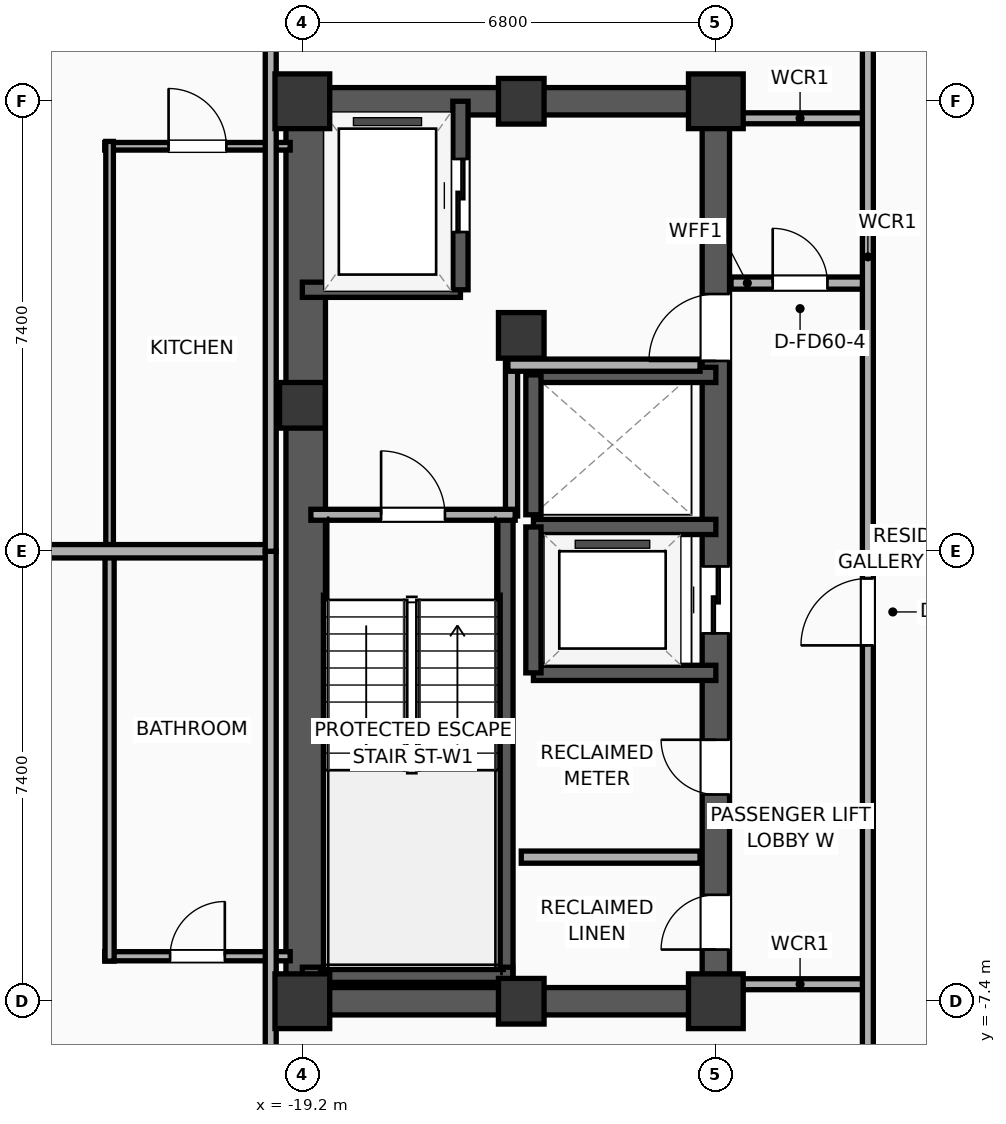
"""IFC4 building model, lengths in metres.
Left out: names, types, materials, properties, quantities, classifications, styles, units other than length and angle.
Written with IfcOpenShell. Run it as: python <this file> out.ifc"""

import sys

from ifc_helpers import new_model, si_unit, direction, frame, frame_2d, origin, origin_2d, place, context, subcontext, project, spatial, rectangle, extrude, element, fill, save


model = new_model("IFC4")
c1 = context("Model", 3, precision=1e-05, world=origin(), true_north=direction((0.0, 1.0)))
c2 = subcontext(c1, "Body", "Model", "MODEL_VIEW")
j1 = project(units=[si_unit("LENGTHUNIT", "METRE"), si_unit("PLANEANGLEUNIT", "RADIAN")], contexts=[c1])
p1 = place(None, origin())
s1 = spatial("IfcSite", under=j1, at=p1, CompositionType="ELEMENT")
p2 = place(p1, origin())
s2 = spatial("IfcBuilding", under=s1, at=p2, CompositionType="ELEMENT")
p3 = place(p2, frame((0.0, 0.0, 152.1)))
s3 = spatial("IfcBuildingStorey", under=s2, at=p3, CompositionType="ELEMENT", Elevation=152.1)
p4 = place(p3, frame((-19.2, -7.4, 0.0), z_axis=(0.0, 0.0, 1.0), x_axis=(1.0, 0.0, 0.0)))
e1 = element("IfcColumn", 1, at=p4, inside=s3, PredefinedType="COLUMN", context=c2, shape_type="SweptSolid", body=[
    extrude(rectangle(XDim=0.9, YDim=0.9, at=origin_2d()), origin(), (0.0, 0.0, 1.0), 3.9),
])
p5 = place(p3, frame((-19.2, 2.4, 0.0), z_axis=(0.0, 0.0, 1.0), x_axis=(1.0, 0.0, 0.0)))
e2 = element("IfcColumn", 2, at=p5, inside=s3, PredefinedType="COLUMN", context=c2, shape_type="SweptSolid", body=[
    extrude(rectangle(XDim=0.75, YDim=0.75, at=origin_2d()), origin(), (0.0, 0.0, 1.0), 3.9),
])
p6 = place(p3, frame((-19.2, 7.4, 0.0), z_axis=(0.0, 0.0, 1.0), x_axis=(1.0, 0.0, 0.0)))
e3 = element("IfcColumn", 3, at=p6, inside=s3, PredefinedType="COLUMN", context=c2, shape_type="SweptSolid", body=[
    extrude(rectangle(XDim=0.9, YDim=0.9, at=origin_2d()), origin(), (0.0, 0.0, 1.0), 3.9),
])
for number, where, z_axis, x_axis in (
    (4, (-15.6, -7.4, 0.0), (0.0, 0.0, 1.0), (1.0, 0.0, 0.0)),
    (5, (-15.6, 7.4, 0.0), (0.0, 0.0, 1.0), (1.0, 0.0, 0.0)),
):
    element("IfcColumn", number, at=place(p3, frame(where, z_axis=z_axis, x_axis=x_axis)), inside=s3, PredefinedType="COLUMN", context=c2, shape_type="SweptSolid", body=[
        extrude(rectangle(XDim=0.75, YDim=0.75, at=origin_2d()), origin(), (0.0, 0.0, 1.0), 3.9),
    ])
p7 = place(p3, frame((-12.4, -7.4, 0.0), z_axis=(0.0, 0.0, 1.0), x_axis=(1.0, 0.0, 0.0)))
e6 = element("IfcColumn", 6, at=p7, inside=s3, PredefinedType="COLUMN", context=c2, shape_type="SweptSolid", body=[
    extrude(rectangle(XDim=0.9, YDim=0.9, at=origin_2d()), origin(), (0.0, 0.0, 1.0), 3.9),
])
p8 = place(p3, frame((-15.6, 3.55, 0.0), z_axis=(0.0, 0.0, 1.0), x_axis=(1.0, 0.0, 0.0)))
e7 = element("IfcColumn", 7, at=p8, inside=s3, PredefinedType="COLUMN", context=c2, shape_type="SweptSolid", body=[
    extrude(rectangle(XDim=0.75, YDim=0.75, at=origin_2d()), origin(), (0.0, 0.0, 1.0), 3.9),
])
p9 = place(p3, frame((-12.4, 7.4, 0.0), z_axis=(0.0, 0.0, 1.0), x_axis=(1.0, 0.0, 0.0)))
e8 = element("IfcColumn", 8, at=p9, inside=s3, PredefinedType="COLUMN", context=c2, shape_type="SweptSolid", body=[
    extrude(rectangle(XDim=0.9, YDim=0.9, at=origin_2d()), origin(), (0.0, 0.0, 1.0), 3.9),
])
for number, where, z_axis, x_axis in (
    (9, (-19.425, -7.4, 0.0), (0.0, 0.0, 1.0), (1.0, 0.0, 0.0)),
    (10, (-19.425, 7.4, 0.0), (0.0, 0.0, 1.0), (1.0, 0.0, 0.0)),
):
    element("IfcWall", number, at=place(p3, frame(where, z_axis=z_axis, x_axis=x_axis)), inside=s3, PredefinedType="SHEAR", context=c2, shape_type="SweptSolid", body=[
        extrude(rectangle(XDim=7.25, YDim=0.45, at=frame_2d((3.625, 0.0))), origin(), (0.0, 0.0, 1.0), 3.65),
    ])
p10 = place(p3, frame((-19.145, -7.4, 0.0), z_axis=(0.0, 0.0, 1.0), x_axis=(0.0, 1.0, 0.0)))
e11 = element("IfcWall", 11, at=p10, inside=s3, PredefinedType="SHEAR", context=c2, shape_type="SweptSolid", body=[
    extrude(rectangle(XDim=14.8, YDim=0.65, at=frame_2d((7.4, 0.0))), origin(), (0.0, 0.0, 1.0), 3.65),
])
p11 = place(p3, frame((-12.4, -7.4, 0.0), z_axis=(0.0, 0.0, 1.0), x_axis=(0.0, 1.0, 0.0)))
e12 = element("IfcWall", 12, at=p11, inside=s3, PredefinedType="SHEAR", context=c2, shape_type="SweptSolid", body=[
    extrude(rectangle(XDim=14.8, YDim=0.45, at=frame_2d((7.4, 0.0))), origin(), (0.0, 0.0, 1.0), 3.65),
])
p12 = place(p11, frame((6.05, 0.0, 0.0)))
e13 = element("IfcOpeningElement", 13, at=p12, cuts=e12, PredefinedType="OPENING", context=c2, shape_type="SweptSolid", body=[
    extrude(rectangle(XDim=1.1, YDim=2.05, at=frame_2d((0.55, 1.025))), frame((0.0, 0.235, 0.0), z_axis=(0.0, -1.0, 0.0), x_axis=(1.0, 0.0, 0.0)), (0.0, 0.0, 1.0), 0.47),
])
p13 = place(p11, frame((10.53, 0.0, 0.0)))
e14 = element("IfcOpeningElement", 14, at=p13, cuts=e12, PredefinedType="OPENING", context=c2, shape_type="SweptSolid", body=[
    extrude(rectangle(XDim=1.1, YDim=2.05, at=frame_2d((0.55, 1.025))), frame((0.0, 0.235, 0.0), z_axis=(0.0, -1.0, 0.0), x_axis=(1.0, 0.0, 0.0)), (0.0, 0.0, 1.0), 0.47),
])
p14 = place(p11, frame((0.85, 0.0, 0.0)))
e15 = element("IfcOpeningElement", 15, at=p14, cuts=e12, PredefinedType="OPENING", context=c2, shape_type="SweptSolid", body=[
    extrude(rectangle(XDim=0.9, YDim=2.05, at=frame_2d((0.45, 1.025))), frame((0.0, 0.235, 0.0), z_axis=(0.0, -1.0, 0.0), x_axis=(1.0, 0.0, 0.0)), (0.0, 0.0, 1.0), 0.47),
])
p15 = place(p11, frame((3.4, 0.0, 0.0)))
e16 = element("IfcOpeningElement", 16, at=p15, cuts=e12, PredefinedType="OPENING", context=c2, shape_type="SweptSolid", body=[
    extrude(rectangle(XDim=0.9, YDim=2.05, at=frame_2d((0.45, 1.025))), frame((0.0, 0.235, 0.0), z_axis=(0.0, -1.0, 0.0), x_axis=(1.0, 0.0, 0.0)), (0.0, 0.0, 1.0), 0.47),
])
p16 = place(p3, frame((-15.86, -7.085, 0.0), z_axis=(0.0, 0.0, 1.0), x_axis=(0.0, 1.0, 0.0)))
e17 = element("IfcWall", 17, at=p16, inside=s3, PredefinedType="SOLIDWALL", context=c2, shape_type="SweptSolid", body=[
    extrude(rectangle(XDim=7.685, YDim=0.25, at=frame_2d((3.843, 0.0))), origin(), (0.0, 0.0, 1.0), 3.65),
])
p17 = place(p3, frame((-19.2, -6.965, 0.0), z_axis=(0.0, 0.0, 1.0), x_axis=(1.0, 0.0, 0.0)))
e18 = element("IfcWall", 18, at=p17, inside=s3, PredefinedType="SOLIDWALL", context=c2, shape_type="SweptSolid", body=[
    extrude(rectangle(XDim=3.46, YDim=0.25, at=frame_2d((1.73, 0.0))), origin(), (0.0, 0.0, 1.0), 3.65),
])
p18 = place(p3, frame((-19.2, 4.3, 0.0), z_axis=(0.0, 0.0, 1.0), x_axis=(1.0, 0.0, 0.0)))
e19 = element("IfcWall", 19, at=p18, inside=s3, PredefinedType="SOLIDWALL", context=c2, shape_type="SweptSolid", body=[
    extrude(rectangle(XDim=2.6, YDim=0.25, at=frame_2d((1.3, 0.0))), origin(), (0.0, 0.0, 1.0), 3.65),
])
p19 = place(p3, frame((-16.6, 4.3, 0.0), z_axis=(0.0, 0.0, 1.0), x_axis=(0.0, 1.0, 0.0)))
e20 = element("IfcWall", 20, at=p19, inside=s3, PredefinedType="SOLIDWALL", context=c2, shape_type="SweptSolid", body=[
    extrude(rectangle(XDim=3.1, YDim=0.25, at=frame_2d((1.55, 0.0))), origin(), (0.0, 0.0, 1.0), 3.65),
])
p20 = place(p19, frame((0.95, 0.0, 0.0)))
e21 = element("IfcOpeningElement", 21, at=p20, cuts=e20, PredefinedType="OPENING", context=c2, shape_type="SweptSolid", body=[
    extrude(rectangle(XDim=1.2, YDim=2.05, at=frame_2d((0.6, 1.025))), frame((0.0, 0.135, 0.0), z_axis=(0.0, -1.0, 0.0), x_axis=(1.0, 0.0, 0.0)), (0.0, 0.0, 1.0), 0.27),
])
for number, where, z_axis, x_axis in (
    (22, (-15.4, -2.0, 0.0), (0.0, 0.0, 1.0), (1.0, 0.0, 0.0)),
    (23, (-12.4, 0.4, 0.0), (0.0, 0.0, 1.0), (-1.0, 0.0, 0.0)),
):
    element("IfcWall", number, at=place(p3, frame(where, z_axis=z_axis, x_axis=x_axis)), inside=s3, PredefinedType="SOLIDWALL", context=c2, shape_type="SweptSolid", body=[
        extrude(rectangle(XDim=3.0, YDim=0.25, at=frame_2d((1.5, 0.0))), origin(), (0.0, 0.0, 1.0), 3.65),
    ])
p21 = place(p3, frame((-15.4, 0.4, 0.0), z_axis=(0.0, 0.0, 1.0), x_axis=(0.0, -1.0, 0.0)))
e24 = element("IfcWall", 24, at=p21, inside=s3, PredefinedType="SOLIDWALL", context=c2, shape_type="SweptSolid", body=[
    extrude(rectangle(XDim=2.4, YDim=0.25, at=frame_2d((1.2, 0.0))), origin(), (0.0, 0.0, 1.0), 3.65),
])
p22 = place(p3, frame((-12.4, 2.9, 0.0), z_axis=(0.0, 0.0, 1.0), x_axis=(-1.0, 0.0, 0.0)))
e25 = element("IfcWall", 25, at=p22, inside=s3, PredefinedType="SOLIDWALL", context=c2, shape_type="SweptSolid", body=[
    extrude(rectangle(XDim=3.0, YDim=0.25, at=frame_2d((1.5, 0.0))), origin(), (0.0, 0.0, 1.0), 3.65),
])
p23 = place(p3, frame((-15.4, 2.9, 0.0), z_axis=(0.0, 0.0, 1.0), x_axis=(0.0, -1.0, 0.0)))
e26 = element("IfcWall", 26, at=p23, inside=s3, PredefinedType="SOLIDWALL", context=c2, shape_type="SweptSolid", body=[
    extrude(rectangle(XDim=2.3, YDim=0.25, at=frame_2d((1.15, 0.0))), origin(), (0.0, 0.0, 1.0), 3.65),
])
p24 = place(p3, frame((-15.76, 0.58, 0.0), z_axis=(0.0, 0.0, 1.0), x_axis=(0.0, 1.0, 0.0)))
e27 = element("IfcWall", 27, at=p24, inside=s3, PredefinedType="PARTITIONING", context=c2, shape_type="SweptSolid", body=[
    extrude(rectangle(XDim=2.52, YDim=0.2, at=frame_2d((1.26, 0.0))), origin(), (0.0, 0.0, 1.0), 3.65),
])
p25 = place(p3, frame((-15.82, 3.06, 0.0), z_axis=(0.0, 0.0, 1.0), x_axis=(1.0, 0.0, 0.0)))
e28 = element("IfcWall", 28, at=p25, inside=s3, PredefinedType="PARTITIONING", context=c2, shape_type="SweptSolid", body=[
    extrude(rectangle(XDim=3.16, YDim=0.2, at=frame_2d((1.58, 0.0))), origin(), (0.0, 0.0, 1.0), 3.65),
])
p26 = place(p3, frame((-19.06, 0.6, 0.0), z_axis=(0.0, 0.0, 1.0), x_axis=(1.0, 0.0, 0.0)))
e29 = element("IfcWall", 29, at=p26, inside=s3, PredefinedType="PARTITIONING", context=c2, shape_type="SweptSolid", body=[
    extrude(rectangle(XDim=3.36, YDim=0.18, at=frame_2d((1.68, 0.0))), origin(), (0.0, 0.0, 1.0), 3.65),
])
p27 = place(p26, frame((1.155, 0.0, 0.0)))
e30 = element("IfcOpeningElement", 30, at=p27, cuts=e29, PredefinedType="OPENING", context=c2, shape_type="SweptSolid", body=[
    extrude(rectangle(XDim=1.05, YDim=2.05, at=frame_2d((0.525, 1.025))), frame((0.0, 0.1, 0.0), z_axis=(0.0, -1.0, 0.0), x_axis=(1.0, 0.0, 0.0)), (0.0, 0.0, 1.0), 0.2),
])
p28 = place(p3, frame((-15.6, -5.03, 0.0), z_axis=(0.0, 0.0, 1.0), x_axis=(1.0, 0.0, 0.0)))
e31 = element("IfcWall", 31, at=p28, inside=s3, PredefinedType="PARTITIONING", context=c2, shape_type="SweptSolid", body=[
    extrude(rectangle(XDim=2.94, YDim=0.2, at=frame_2d((1.47, 0.0))), origin(), (0.0, 0.0, 1.0), 3.65),
])
p29 = place(p3, frame((-12.15, 4.41, 0.0), z_axis=(0.0, 0.0, 1.0), x_axis=(1.0, 0.0, 0.0)))
e32 = element("IfcWall", 32, at=p29, inside=s3, PredefinedType="PARTITIONING", context=c2, shape_type="SweptSolid", body=[
    extrude(rectangle(XDim=2.27, YDim=0.2, at=frame_2d((1.135, 0.0))), origin(), (0.0, 0.0, 1.0), 3.65),
])
p30 = place(p29, frame((0.685, 0.0, 0.0)))
e33 = element("IfcOpeningElement", 33, at=p30, cuts=e32, PredefinedType="OPENING", context=c2, shape_type="SweptSolid", body=[
    extrude(rectangle(XDim=0.9, YDim=2.05, at=frame_2d((0.45, 1.025))), frame((0.0, 0.11, 0.0), z_axis=(0.0, -1.0, 0.0), x_axis=(1.0, 0.0, 0.0)), (0.0, 0.0, 1.0), 0.22),
])
for number, where, z_axis, x_axis in (
    (34, (-12.15, 7.12, 0.0), (0.0, 0.0, 1.0), (1.0, 0.0, 0.0)),
    (35, (-12.15, -7.12, 0.0), (0.0, 0.0, 1.0), (1.0, 0.0, 0.0)),
):
    element("IfcWall", number, at=place(p3, frame(where, z_axis=z_axis, x_axis=x_axis)), inside=s3, PredefinedType="PARTITIONING", context=c2, shape_type="SweptSolid", body=[
        extrude(rectangle(XDim=2.27, YDim=0.18, at=frame_2d((1.135, 0.0))), origin(), (0.0, 0.0, 1.0), 3.65),
    ])
p31 = place(p3, frame((-9.9, -9.98, 0.0), z_axis=(0.0, 0.0, 1.0), x_axis=(0.0, 1.0, 0.0)))
e36 = element("IfcWall", 36, at=p31, inside=s3, PredefinedType="PARTITIONING", context=c2, shape_type="SweptSolid", body=[
    extrude(rectangle(XDim=19.96, YDim=0.18, at=frame_2d((9.98, 0.0))), origin(), (0.0, 0.0, 1.0), 3.65),
])
p32 = place(p31, frame((8.432, 0.0, 0.0)))
e37 = element("IfcOpeningElement", 37, at=p32, cuts=e36, PredefinedType="OPENING", context=c2, shape_type="SweptSolid", body=[
    extrude(rectangle(XDim=1.1, YDim=2.05, at=frame_2d((0.55, 1.025))), frame((0.0, 0.1, 0.0), z_axis=(0.0, -1.0, 0.0), x_axis=(1.0, 0.0, 0.0)), (0.0, 0.0, 1.0), 0.2),
])
p33 = place(p3, frame((-22.45, -6.66, 0.0), z_axis=(0.0, 0.0, 1.0), x_axis=(1.0, 0.0, 0.0)))
e38 = element("IfcWall", 38, at=p33, inside=s3, PredefinedType="PLUMBINGWALL", context=c2, shape_type="SweptSolid", body=[
    extrude(rectangle(XDim=3.05, YDim=0.15, at=frame_2d((1.525, 0.0))), origin(), (0.0, 0.0, 1.0), 3.65),
])
p34 = place(p33, frame((1.075, 0.0, 0.0)))
e39 = element("IfcOpeningElement", 39, at=p34, cuts=e38, PredefinedType="OPENING", context=c2, shape_type="SweptSolid", body=[
    extrude(rectangle(XDim=0.9, YDim=2.05, at=frame_2d((0.45, 1.025))), frame((0.0, 0.085, 0.0), z_axis=(0.0, -1.0, 0.0), x_axis=(1.0, 0.0, 0.0)), (0.0, 0.0, 1.0), 0.17),
])
p35 = place(p3, frame((-22.37, -6.74, 0.0), z_axis=(0.0, 0.0, 1.0), x_axis=(0.0, 1.0, 0.0)))
e40 = element("IfcWall", 40, at=p35, inside=s3, PredefinedType="PLUMBINGWALL", context=c2, shape_type="SweptSolid", body=[
    extrude(rectangle(XDim=6.72, YDim=0.15, at=frame_2d((3.36, 0.0))), origin(), (0.0, 0.0, 1.0), 3.65),
])
p36 = place(p3, frame((-22.45, 6.66, 0.0), z_axis=(0.0, 0.0, 1.0), x_axis=(1.0, 0.0, 0.0)))
e41 = element("IfcWall", 41, at=p36, inside=s3, PredefinedType="PARTITIONING", context=c2, shape_type="SweptSolid", body=[
    extrude(rectangle(XDim=3.05, YDim=0.125, at=frame_2d((1.525, 0.0))), origin(), (0.0, 0.0, 1.0), 3.04),
])
p37 = place(p36, frame((1.05, 0.0, 0.0)))
e42 = element("IfcOpeningElement", 42, at=p37, cuts=e41, PredefinedType="OPENING", context=c2, shape_type="SweptSolid", body=[
    extrude(rectangle(XDim=0.95, YDim=2.05, at=frame_2d((0.475, 1.025))), frame((0.0, 0.073, 0.0), z_axis=(0.0, -1.0, 0.0), x_axis=(1.0, 0.0, 0.0)), (0.0, 0.0, 1.0), 0.145),
])
p38 = place(p3, frame((-22.37, 0.02, 0.0), z_axis=(0.0, 0.0, 1.0), x_axis=(0.0, 1.0, 0.0)))
e43 = element("IfcWall", 43, at=p38, inside=s3, PredefinedType="PARTITIONING", context=c2, shape_type="SweptSolid", body=[
    extrude(rectangle(XDim=6.72, YDim=0.125, at=frame_2d((3.36, 0.0))), origin(), (0.0, 0.0, 1.0), 3.65),
])
p39 = place(p3, frame((-19.72, 0.0, 0.0), z_axis=(0.0, 0.0, 1.0), x_axis=(-1.0, 0.0, 0.0)))
e44 = element("IfcWall", 44, at=p39, inside=s3, PredefinedType="PARTITIONING", context=c2, shape_type="SweptSolid", body=[
    extrude(rectangle(XDim=13.336, YDim=0.22, at=frame_2d((6.668, 0.0))), origin(), (0.0, 0.0, 1.0), 3.65),
])
p40 = place(p3, frame((-19.72, -22.678, 0.0), z_axis=(0.0, 0.0, 1.0), x_axis=(0.0, 1.0, 0.0)))
e45 = element("IfcWall", 45, at=p40, inside=s3, PredefinedType="PARTITIONING", context=c2, shape_type="SweptSolid", body=[
    extrude(rectangle(XDim=22.678, YDim=0.18, at=frame_2d((11.339, 0.0))), origin(), (0.0, 0.0, 1.0), 3.65),
])
p41 = place(p40, frame((11.599, 0.0, 0.0)))
e46 = element("IfcOpeningElement", 46, at=p41, cuts=e45, PredefinedType="OPENING", context=c2, shape_type="SweptSolid", body=[
    extrude(rectangle(XDim=0.9, YDim=2.05, at=frame_2d((0.45, 1.025))), frame((0.0, 0.1, 0.0), z_axis=(0.0, -1.0, 0.0), x_axis=(1.0, 0.0, 0.0)), (0.0, 0.0, 1.0), 0.2),
])
p42 = place(p3, frame((-19.72, 0.0, 0.0), z_axis=(0.0, 0.0, 1.0), x_axis=(0.0, 1.0, 0.0)))
e47 = element("IfcWall", 47, at=p42, inside=s3, PredefinedType="PARTITIONING", context=c2, shape_type="SweptSolid", body=[
    extrude(rectangle(XDim=18.005, YDim=0.18, at=frame_2d((9.002, 0.0))), origin(), (0.0, 0.0, 1.0), 3.04),
])
p43 = place(p42, frame((10.18, 0.0, 0.0)))
e48 = element("IfcOpeningElement", 48, at=p43, cuts=e47, PredefinedType="OPENING", context=c2, shape_type="SweptSolid", body=[
    extrude(rectangle(XDim=0.9, YDim=2.05, at=frame_2d((0.45, 1.025))), frame((0.0, 0.1, 0.0), z_axis=(0.0, -1.0, 0.0), x_axis=(1.0, 0.0, 0.0)), (0.0, 0.0, 1.0), 0.2),
])
p44 = place(p20, origin())
e49 = element("IfcDoor", 49, at=p44, inside=s3, OperationType="SLIDING_TO_LEFT", PredefinedType="DOOR", context=c2, shape_type="SweptSolid", body=[
    extrude(rectangle(XDim=1.2, YDim=2.05, at=frame_2d((0.6, 1.025))), frame((0.0, 0.025, 0.0), z_axis=(0.0, -1.0, 0.0), x_axis=(1.0, 0.0, 0.0)), (0.0, 0.0, 1.0), 0.05),
])
fill(e21, e49)
p45 = place(p12, origin())
e50 = element("IfcDoor", 50, at=p45, inside=s3, OperationType="SLIDING_TO_LEFT", PredefinedType="DOOR", context=c2, shape_type="SweptSolid", body=[
    extrude(rectangle(XDim=1.1, YDim=2.05, at=frame_2d((0.55, 1.025))), frame((0.0, 0.025, 0.0), z_axis=(0.0, -1.0, 0.0), x_axis=(1.0, 0.0, 0.0)), (0.0, 0.0, 1.0), 0.05),
])
fill(e13, e50)
p46 = place(p27, origin())
e51 = element("IfcDoor", 51, at=p46, inside=s3, OperationType="SINGLE_SWING_LEFT", PredefinedType="DOOR", context=c2, shape_type="SweptSolid", body=[
    extrude(rectangle(XDim=1.05, YDim=2.05, at=frame_2d((0.525, 1.025))), frame((0.0, 0.025, 0.0), z_axis=(0.0, -1.0, 0.0), x_axis=(1.0, 0.0, 0.0)), (0.0, 0.0, 1.0), 0.05),
])
fill(e30, e51)
p47 = place(p30, origin())
e52 = element("IfcDoor", 52, at=p47, inside=s3, OperationType="SINGLE_SWING_LEFT", PredefinedType="DOOR", context=c2, shape_type="SweptSolid", body=[
    extrude(rectangle(XDim=0.9, YDim=2.05, at=frame_2d((0.45, 1.025))), frame((0.0, 0.025, 0.0), z_axis=(0.0, -1.0, 0.0), x_axis=(1.0, 0.0, 0.0)), (0.0, 0.0, 1.0), 0.05),
])
fill(e33, e52)
p48 = place(p32, origin())
e53 = element("IfcDoor", 53, at=p48, inside=s3, OperationType="SINGLE_SWING_LEFT", PredefinedType="DOOR", context=c2, shape_type="SweptSolid", body=[
    extrude(rectangle(XDim=1.1, YDim=2.05, at=frame_2d((0.55, 1.025))), frame((0.0, 0.025, 0.0), z_axis=(0.0, -1.0, 0.0), x_axis=(1.0, 0.0, 0.0)), (0.0, 0.0, 1.0), 0.05),
])
fill(e37, e53)
p49 = place(p34, origin())
e54 = element("IfcDoor", 54, at=p49, inside=s3, OperationType="SINGLE_SWING_RIGHT", PredefinedType="DOOR", context=c2, shape_type="SweptSolid", body=[
    extrude(rectangle(XDim=0.9, YDim=2.05, at=frame_2d((0.45, 1.025))), frame((0.0, 0.025, 0.0), z_axis=(0.0, -1.0, 0.0), x_axis=(1.0, 0.0, 0.0)), (0.0, 0.0, 1.0), 0.05),
])
fill(e39, e54)
p50 = place(p37, origin())
e55 = element("IfcDoor", 55, at=p50, inside=s3, OperationType="SINGLE_SWING_LEFT", PredefinedType="DOOR", context=c2, shape_type="SweptSolid", body=[
    extrude(rectangle(XDim=0.95, YDim=2.05, at=frame_2d((0.475, 1.025))), frame((0.0, 0.025, 0.0), z_axis=(0.0, -1.0, 0.0), x_axis=(1.0, 0.0, 0.0)), (0.0, 0.0, 1.0), 0.05),
])
fill(e42, e55)
p51 = place(p13, origin())
e56 = element("IfcDoor", 56, at=p51, inside=s3, OperationType="SINGLE_SWING_LEFT", PredefinedType="DOOR", context=c2, shape_type="SweptSolid", body=[
    extrude(rectangle(XDim=1.1, YDim=2.05, at=frame_2d((0.55, 1.025))), frame((0.0, 0.025, 0.0), z_axis=(0.0, -1.0, 0.0), x_axis=(1.0, 0.0, 0.0)), (0.0, 0.0, 1.0), 0.05),
])
fill(e14, e56)
p52 = place(p14, origin())
e57 = element("IfcDoor", 57, at=p52, inside=s3, OperationType="SINGLE_SWING_LEFT", PredefinedType="DOOR", context=c2, shape_type="SweptSolid", body=[
    extrude(rectangle(XDim=0.9, YDim=2.05, at=frame_2d((0.45, 1.025))), frame((0.0, 0.025, 0.0), z_axis=(0.0, -1.0, 0.0), x_axis=(1.0, 0.0, 0.0)), (0.0, 0.0, 1.0), 0.05),
])
fill(e15, e57)
p53 = place(p15, origin())
e58 = element("IfcDoor", 58, at=p53, inside=s3, OperationType="SINGLE_SWING_RIGHT", PredefinedType="DOOR", context=c2, shape_type="SweptSolid", body=[
    extrude(rectangle(XDim=0.9, YDim=2.05, at=frame_2d((0.45, 1.025))), frame((0.0, 0.025, 0.0), z_axis=(0.0, -1.0, 0.0), x_axis=(1.0, 0.0, 0.0)), (0.0, 0.0, 1.0), 0.05),
])
fill(e16, e58)
save(model, sys.argv[1])
